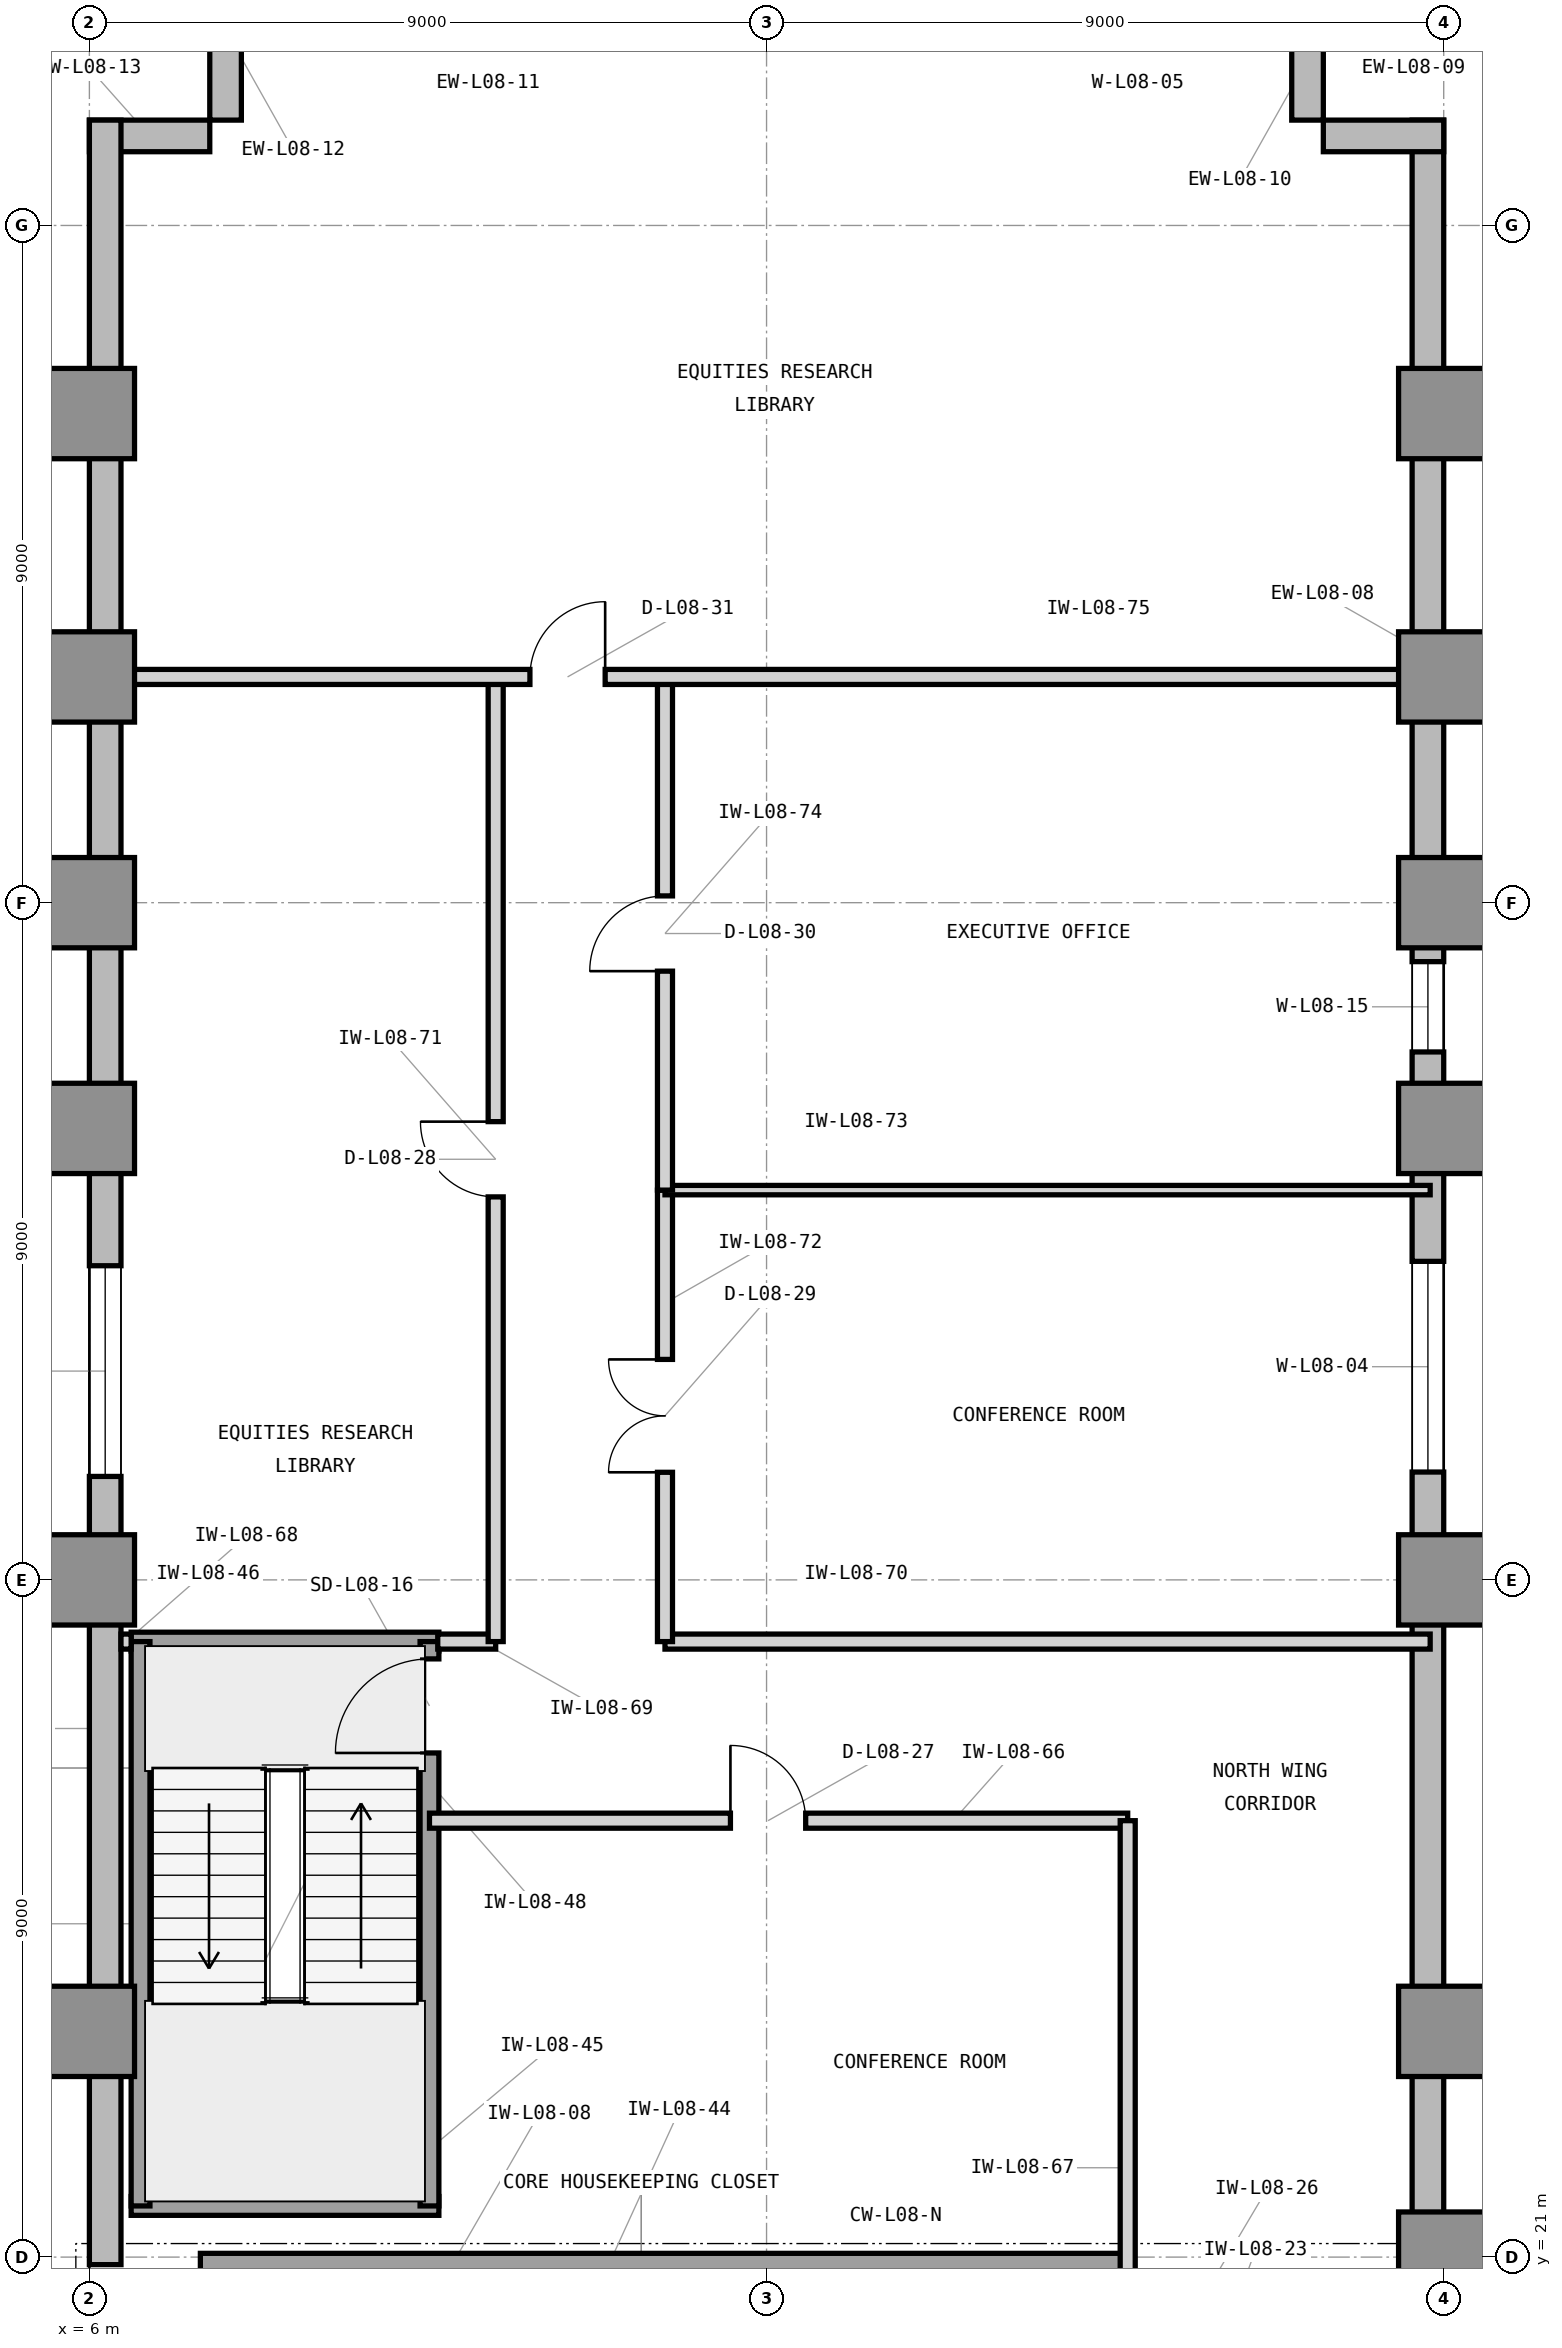
"""IFC4 building model, lengths in metres.
Left out: names, types, materials, properties, quantities, classifications, styles, units other than length and angle.
Written with IfcOpenShell. Run it as: python <this file> out.ifc"""

import sys

from ifc_helpers import new_model, si_unit, direction, frame, frame_2d, origin, origin_2d, place, context, subcontext, project, spatial, rectangle, extrude, element, fill, save


model = new_model("IFC4")
c1 = context("Model", 3, precision=1e-05, world=origin(), true_north=direction((0.0, 1.0)))
c2 = subcontext(c1, "Body", "Model", "MODEL_VIEW")
j1 = project(units=[si_unit("LENGTHUNIT", "METRE"), si_unit("PLANEANGLEUNIT", "RADIAN")], contexts=[c1])
p1 = place(None, origin())
s1 = spatial("IfcSite", under=j1, at=p1, CompositionType="ELEMENT")
p2 = place(p1, origin())
s2 = spatial("IfcBuilding", under=s1, at=p2, CompositionType="ELEMENT")
p3 = place(p2, frame((0.0, 0.0, 38.4)))
s3 = spatial("IfcBuildingStorey", under=s2, at=p3, CompositionType="ELEMENT", Elevation=38.4)
p4 = place(p3, frame((7.475, 20.65, 0.0), z_axis=(0.0, 0.0, 1.0), x_axis=(1.0, 0.0, 0.0)))
e1 = element("IfcWall", 1, at=p4, inside=s3, PredefinedType="SHEAR", context=c2, shape_type="SweptSolid", body=[
    extrude(rectangle(XDim=12.325, YDim=0.8, at=frame_2d((6.163, 0.0))), origin(), (0.0, 0.0, 1.0), 4.2),
])
for number, where, z_axis, x_axis in (
    (2, (24.0, 21.0, 0.0), (0.0, 0.0, 1.0), (1.0, 0.0, 0.0)),
    (3, (6.0, 24.0, 0.0), (0.0, 0.0, 1.0), (1.0, 0.0, 0.0)),
    (4, (24.0, 24.0, 0.0), (0.0, 0.0, 1.0), (1.0, 0.0, 0.0)),
    (5, (6.0, 30.0, 0.0), (0.0, 0.0, 1.0), (1.0, 0.0, 0.0)),
    (6, (24.0, 30.0, 0.0), (0.0, 0.0, 1.0), (1.0, 0.0, 0.0)),
    (7, (6.0, 36.0, 0.0), (0.0, 0.0, 1.0), (1.0, 0.0, 0.0)),
    (8, (24.0, 36.0, 0.0), (0.0, 0.0, 1.0), (1.0, 0.0, 0.0)),
    (9, (6.0, 39.0, 0.0), (0.0, 0.0, 1.0), (1.0, 0.0, 0.0)),
    (10, (24.0, 39.0, 0.0), (0.0, 0.0, 1.0), (1.0, 0.0, 0.0)),
    (11, (6.0, 42.0, 0.0), (0.0, 0.0, 1.0), (1.0, 0.0, 0.0)),
    (12, (24.0, 42.0, 0.0), (0.0, 0.0, 1.0), (1.0, 0.0, 0.0)),
    (13, (6.0, 45.5, 0.0), (0.0, 0.0, 1.0), (1.0, 0.0, 0.0)),
    (14, (24.0, 45.5, 0.0), (0.0, 0.0, 1.0), (1.0, 0.0, 0.0)),
):
    element("IfcColumn", number, at=place(p3, frame(where, z_axis=z_axis, x_axis=x_axis)), inside=s3, PredefinedType="COLUMN", context=c2, shape_type="SweptSolid", body=[
        extrude(rectangle(XDim=1.2, YDim=1.2, at=origin_2d()), origin(), (0.0, 0.0, 1.0), 4.2),
    ])
p5 = place(p3, frame((64.4, 20.79, 0.0), z_axis=(0.0, 0.0, 1.0), x_axis=(-1.0, 0.0, 0.0)))
e15 = element("IfcWall", 15, at=p5, inside=s3, PredefinedType="STANDARD", context=c2, shape_type="SweptSolid", body=[
    extrude(rectangle(XDim=40.4, YDim=0.42, at=frame_2d((20.2, 0.0))), origin(), (0.0, 0.0, 1.0), 3.98),
])
p6 = place(p5, frame((26.375, 0.0, 0.85)))
e16 = element("IfcOpeningElement", 16, at=p6, cuts=e15, PredefinedType="OPENING", context=c2, shape_type="SweptSolid", body=[
    extrude(rectangle(XDim=2.8, YDim=2.45, at=frame_2d((1.4, 1.225))), frame((0.0, 0.22, 0.0), z_axis=(0.0, -1.0, 0.0), x_axis=(1.0, 0.0, 0.0)), (0.0, 0.0, 1.0), 0.44),
])
p7 = place(p5, frame((38.222, 0.0, 0.85)))
e17 = element("IfcOpeningElement", 17, at=p7, cuts=e15, PredefinedType="OPENING", context=c2, shape_type="SweptSolid", body=[
    extrude(rectangle(XDim=1.2, YDim=2.45, at=frame_2d((0.6, 1.225))), frame((0.0, 0.22, 0.0), z_axis=(0.0, -1.0, 0.0), x_axis=(1.0, 0.0, 0.0)), (0.0, 0.0, 1.0), 0.44),
])
p8 = place(p5, frame((32.536, 0.0, 0.85)))
e18 = element("IfcOpeningElement", 18, at=p8, cuts=e15, PredefinedType="OPENING", context=c2, shape_type="SweptSolid", body=[
    extrude(rectangle(XDim=2.8, YDim=2.45, at=frame_2d((1.4, 1.225))), frame((0.0, 0.22, 0.0), z_axis=(0.0, -1.0, 0.0), x_axis=(1.0, 0.0, 0.0)), (0.0, 0.0, 1.0), 0.44),
])
p9 = place(p5, frame((17.386, 0.0, 0.85)))
e19 = element("IfcOpeningElement", 19, at=p9, cuts=e15, PredefinedType="OPENING", context=c2, shape_type="SweptSolid", body=[
    extrude(rectangle(XDim=2.8, YDim=2.45, at=frame_2d((1.4, 1.225))), frame((0.0, 0.22, 0.0), z_axis=(0.0, -1.0, 0.0), x_axis=(1.0, 0.0, 0.0)), (0.0, 0.0, 1.0), 0.44),
])
p10 = place(p3, frame((23.79, 21.0, 0.0), z_axis=(0.0, 0.0, 1.0), x_axis=(0.0, 1.0, 0.0)))
e20 = element("IfcWall", 20, at=p10, inside=s3, PredefinedType="STANDARD", context=c2, shape_type="SweptSolid", body=[
    extrude(rectangle(XDim=28.4, YDim=0.42, at=frame_2d((14.2, 0.0))), origin(), (0.0, 0.0, 1.0), 3.98),
])
p11 = place(p10, frame((10.433, 0.0, 0.85)))
e21 = element("IfcOpeningElement", 21, at=p11, cuts=e20, PredefinedType="OPENING", context=c2, shape_type="SweptSolid", body=[
    extrude(rectangle(XDim=2.8, YDim=2.45, at=frame_2d((1.4, 1.225))), frame((0.0, 0.22, 0.0), z_axis=(0.0, -1.0, 0.0), x_axis=(1.0, 0.0, 0.0)), (0.0, 0.0, 1.0), 0.44),
])
p12 = place(p10, frame((16.016, 0.0, 0.85)))
e22 = element("IfcOpeningElement", 22, at=p12, cuts=e20, PredefinedType="OPENING", context=c2, shape_type="SweptSolid", body=[
    extrude(rectangle(XDim=1.2, YDim=2.45, at=frame_2d((0.6, 1.225))), frame((0.0, 0.22, 0.0), z_axis=(0.0, -1.0, 0.0), x_axis=(1.0, 0.0, 0.0)), (0.0, 0.0, 1.0), 0.44),
])
for number, where, z_axis, x_axis in (
    (23, (24.0, 49.19, 0.0), (0.0, 0.0, 1.0), (-1.0, 0.0, 0.0)),
    (24, (22.19, 49.4, 0.0), (0.0, 0.0, 1.0), (0.0, 1.0, 0.0)),
    (25, (7.81, 51.0, 0.0), (0.0, 0.0, 1.0), (0.0, -1.0, 0.0)),
    (26, (7.6, 49.19, 0.0), (0.0, 0.0, 1.0), (-1.0, 0.0, 0.0)),
):
    element("IfcWall", number, at=place(p3, frame(where, z_axis=z_axis, x_axis=x_axis)), inside=s3, PredefinedType="STANDARD", context=c2, shape_type="SweptSolid", body=[
        extrude(rectangle(XDim=1.6, YDim=0.42, at=frame_2d((0.8, 0.0))), origin(), (0.0, 0.0, 1.0), 3.98),
    ])
p13 = place(p3, frame((6.21, 49.4, 0.0), z_axis=(0.0, 0.0, 1.0), x_axis=(0.0, -1.0, 0.0)))
e27 = element("IfcWall", 27, at=p13, inside=s3, PredefinedType="STANDARD", context=c2, shape_type="SweptSolid", body=[
    extrude(rectangle(XDim=28.5, YDim=0.42, at=frame_2d((14.25, 0.0))), origin(), (0.0, 0.0, 1.0), 3.98),
])
p14 = place(p13, frame((15.225, 0.0, 0.85)))
e28 = element("IfcOpeningElement", 28, at=p14, cuts=e27, PredefinedType="OPENING", context=c2, shape_type="SweptSolid", body=[
    extrude(rectangle(XDim=2.8, YDim=2.45, at=frame_2d((1.4, 1.225))), frame((0.0, 0.22, 0.0), z_axis=(0.0, -1.0, 0.0), x_axis=(1.0, 0.0, 0.0)), (0.0, 0.0, 1.0), 0.44),
])
for number, where, z_axis, x_axis in (
    (29, (6.555, 21.68, 0.0), (0.0, 0.0, 1.0), (1.0, 0.0, 0.0)),
    (30, (6.555, 29.18, 0.0), (0.0, 0.0, 1.0), (1.0, 0.0, 0.0)),
):
    element("IfcWall", number, at=place(p3, frame(where, z_axis=z_axis, x_axis=x_axis)), inside=s3, PredefinedType="SHEAR", context=c2, shape_type="SweptSolid", body=[
        extrude(rectangle(XDim=4.09, YDim=0.25, at=frame_2d((2.045, 0.0))), origin(), (0.0, 0.0, 1.0), 4.2),
    ])
p15 = place(p3, frame((6.68, 21.68, 0.0), z_axis=(0.0, 0.0, 1.0), x_axis=(0.0, 1.0, 0.0)))
e31 = element("IfcWall", 31, at=p15, inside=s3, PredefinedType="SHEAR", context=c2, shape_type="SweptSolid", body=[
    extrude(rectangle(XDim=7.5, YDim=0.25, at=frame_2d((3.75, 0.0))), origin(), (0.0, 0.0, 1.0), 4.2),
])
p16 = place(p3, frame((10.52, 21.68, 0.0), z_axis=(0.0, 0.0, 1.0), x_axis=(0.0, 1.0, 0.0)))
e32 = element("IfcWall", 32, at=p16, inside=s3, PredefinedType="SHEAR", context=c2, shape_type="SweptSolid", body=[
    extrude(rectangle(XDim=7.5, YDim=0.25, at=frame_2d((3.75, 0.0))), origin(), (0.0, 0.0, 1.0), 4.2),
])
p17 = place(p16, frame((6.02, 0.0, 0.0)))
e33 = element("IfcOpeningElement", 33, at=p17, cuts=e32, PredefinedType="OPENING", context=c2, shape_type="SweptSolid", body=[
    extrude(rectangle(XDim=1.25, YDim=2.2, at=frame_2d((0.625, 1.1))), frame((0.0, 0.135, 0.0), z_axis=(0.0, -1.0, 0.0), x_axis=(1.0, 0.0, 0.0)), (0.0, 0.0, 1.0), 0.27),
])
p18 = place(p3, frame((10.52, 26.8, 0.0), z_axis=(0.0, 0.0, 1.0), x_axis=(1.0, 0.0, 0.0)))
e34 = element("IfcWall", 34, at=p18, inside=s3, PredefinedType="PARTITIONING", context=c2, shape_type="SweptSolid", body=[
    extrude(rectangle(XDim=9.28, YDim=0.2, at=frame_2d((4.64, 0.0))), origin(), (0.0, 0.0, 1.0), 3.97),
])
p19 = place(p18, frame((4.0, 0.0, 0.0)))
e35 = element("IfcOpeningElement", 35, at=p19, cuts=e34, PredefinedType="OPENING", context=c2, shape_type="SweptSolid", body=[
    extrude(rectangle(XDim=1.0, YDim=2.15, at=frame_2d((0.5, 1.075))), frame((0.0, 0.11, 0.0), z_axis=(0.0, -1.0, 0.0), x_axis=(1.0, 0.0, 0.0)), (0.0, 0.0, 1.0), 0.22),
])
p20 = place(p3, frame((19.8, 20.65, 0.0), z_axis=(0.0, 0.0, 1.0), x_axis=(0.0, 1.0, 0.0)))
e36 = element("IfcWall", 36, at=p20, inside=s3, PredefinedType="PARTITIONING", context=c2, shape_type="SweptSolid", body=[
    extrude(rectangle(XDim=6.15, YDim=0.2, at=frame_2d((3.075, 0.0))), origin(), (0.0, 0.0, 1.0), 3.97),
])
p21 = place(p3, frame((6.42, 29.18, 0.0), z_axis=(0.0, 0.0, 1.0), x_axis=(1.0, 0.0, 0.0)))
e37 = element("IfcWall", 37, at=p21, inside=s3, PredefinedType="PARTITIONING", context=c2, shape_type="SweptSolid", body=[
    extrude(rectangle(XDim=0.135, YDim=0.2, at=frame_2d((0.067, 0.0))), origin(), (0.0, 0.0, 1.0), 3.97),
])
p22 = place(p3, frame((10.63, 29.18, 0.0), z_axis=(0.0, 0.0, 1.0), x_axis=(1.0, 0.0, 0.0)))
e38 = element("IfcWall", 38, at=p22, inside=s3, PredefinedType="PARTITIONING", context=c2, shape_type="SweptSolid", body=[
    extrude(rectangle(XDim=0.77, YDim=0.2, at=frame_2d((0.385, 0.0))), origin(), (0.0, 0.0, 1.0), 3.97),
])
p23 = place(p3, frame((13.65, 29.18, 0.0), z_axis=(0.0, 0.0, 1.0), x_axis=(1.0, 0.0, 0.0)))
e39 = element("IfcWall", 39, at=p23, inside=s3, PredefinedType="PARTITIONING", context=c2, shape_type="SweptSolid", body=[
    extrude(rectangle(XDim=10.17, YDim=0.2, at=frame_2d((5.085, 0.0))), origin(), (0.0, 0.0, 1.0), 3.97),
])
p24 = place(p3, frame((11.4, 29.18, 0.0), z_axis=(0.0, 0.0, 1.0), x_axis=(0.0, 1.0, 0.0)))
e40 = element("IfcWall", 40, at=p24, inside=s3, PredefinedType="PARTITIONING", context=c2, shape_type="SweptSolid", body=[
    extrude(rectangle(XDim=12.82, YDim=0.2, at=frame_2d((6.41, 0.0))), origin(), (0.0, 0.0, 1.0), 3.97),
])
p25 = place(p24, frame((5.91, 0.0, 0.0)))
e41 = element("IfcOpeningElement", 41, at=p25, cuts=e40, PredefinedType="OPENING", context=c2, shape_type="SweptSolid", body=[
    extrude(rectangle(XDim=1.0, YDim=2.15, at=frame_2d((0.5, 1.075))), frame((0.0, 0.11, 0.0), z_axis=(0.0, -1.0, 0.0), x_axis=(1.0, 0.0, 0.0)), (0.0, 0.0, 1.0), 0.22),
])
p26 = place(p3, frame((13.65, 29.18, 0.0), z_axis=(0.0, 0.0, 1.0), x_axis=(0.0, 1.0, 0.0)))
e42 = element("IfcWall", 42, at=p26, inside=s3, PredefinedType="PARTITIONING", context=c2, shape_type="SweptSolid", body=[
    extrude(rectangle(XDim=6.0, YDim=0.2, at=frame_2d((3.0, 0.0))), origin(), (0.0, 0.0, 1.0), 3.97),
])
p27 = place(p26, frame((2.25, 0.0, 0.0)))
e43 = element("IfcOpeningElement", 43, at=p27, cuts=e42, PredefinedType="OPENING", context=c2, shape_type="SweptSolid", body=[
    extrude(rectangle(XDim=1.5, YDim=2.3, at=frame_2d((0.75, 1.15))), frame((0.0, 0.11, 0.0), z_axis=(0.0, -1.0, 0.0), x_axis=(1.0, 0.0, 0.0)), (0.0, 0.0, 1.0), 0.22),
])
p28 = place(p3, frame((13.65, 35.18, 0.0), z_axis=(0.0, 0.0, 1.0), x_axis=(1.0, 0.0, 0.0)))
e44 = element("IfcWall", 44, at=p28, inside=s3, PredefinedType="PARTITIONING", context=c2, shape_type="SweptSolid", body=[
    extrude(rectangle(XDim=10.17, YDim=0.125, at=frame_2d((5.085, 0.0))), origin(), (0.0, 0.0, 1.0), 3.97),
])
p29 = place(p3, frame((13.65, 35.18, 0.0), z_axis=(0.0, 0.0, 1.0), x_axis=(0.0, 1.0, 0.0)))
e45 = element("IfcWall", 45, at=p29, inside=s3, PredefinedType="PARTITIONING", context=c2, shape_type="SweptSolid", body=[
    extrude(rectangle(XDim=6.82, YDim=0.2, at=frame_2d((3.41, 0.0))), origin(), (0.0, 0.0, 1.0), 3.97),
])
p30 = place(p29, frame((2.91, 0.0, 0.0)))
e46 = element("IfcOpeningElement", 46, at=p30, cuts=e45, PredefinedType="OPENING", context=c2, shape_type="SweptSolid", body=[
    extrude(rectangle(XDim=1.0, YDim=2.15, at=frame_2d((0.5, 1.075))), frame((0.0, 0.11, 0.0), z_axis=(0.0, -1.0, 0.0), x_axis=(1.0, 0.0, 0.0)), (0.0, 0.0, 1.0), 0.22),
])
p31 = place(p3, frame((6.18, 42.0, 0.0), z_axis=(0.0, 0.0, 1.0), x_axis=(1.0, 0.0, 0.0)))
e47 = element("IfcWall", 47, at=p31, inside=s3, PredefinedType="PARTITIONING", context=c2, shape_type="SweptSolid", body=[
    extrude(rectangle(XDim=17.64, YDim=0.2, at=frame_2d((8.82, 0.0))), origin(), (0.0, 0.0, 1.0), 3.114),
])
p32 = place(p31, frame((5.675, 0.0, 0.0)))
e48 = element("IfcOpeningElement", 48, at=p32, cuts=e47, PredefinedType="OPENING", context=c2, shape_type="SweptSolid", body=[
    extrude(rectangle(XDim=1.0, YDim=2.15, at=frame_2d((0.5, 1.075))), frame((0.0, 0.11, 0.0), z_axis=(0.0, -1.0, 0.0), x_axis=(1.0, 0.0, 0.0)), (0.0, 0.0, 1.0), 0.22),
])
p33 = place(p11, origin())
e49 = element("IfcWindow", 49, at=p33, inside=s3, PartitioningType="SINGLE_PANEL", PredefinedType="WINDOW", context=c2, shape_type="SweptSolid", body=[
    extrude(rectangle(XDim=2.8, YDim=2.45, at=frame_2d((1.4, 1.225))), frame((0.0, 0.11, 0.0), z_axis=(0.0, -1.0, 0.0), x_axis=(1.0, 0.0, 0.0)), (0.0, 0.0, 1.0), 0.06),
])
fill(e21, e49)
p34 = place(p14, origin())
e50 = element("IfcWindow", 50, at=p34, inside=s3, PartitioningType="SINGLE_PANEL", PredefinedType="WINDOW", context=c2, shape_type="SweptSolid", body=[
    extrude(rectangle(XDim=2.8, YDim=2.45, at=frame_2d((1.4, 1.225))), frame((0.0, 0.11, 0.0), z_axis=(0.0, -1.0, 0.0), x_axis=(1.0, 0.0, 0.0)), (0.0, 0.0, 1.0), 0.06),
])
fill(e28, e50)
p35 = place(p17, origin())
e51 = element("IfcDoor", 51, at=p35, inside=s3, OperationType="SINGLE_SWING_LEFT", PredefinedType="DOOR", context=c2, shape_type="SweptSolid", body=[
    extrude(rectangle(XDim=1.25, YDim=2.2, at=frame_2d((0.625, 1.1))), frame((0.0, 0.025, 0.0), z_axis=(0.0, -1.0, 0.0), x_axis=(1.0, 0.0, 0.0)), (0.0, 0.0, 1.0), 0.05),
])
fill(e33, e51)
p36 = place(p19, origin())
e52 = element("IfcDoor", 52, at=p36, inside=s3, OperationType="SINGLE_SWING_LEFT", PredefinedType="DOOR", context=c2, shape_type="SweptSolid", body=[
    extrude(rectangle(XDim=1.0, YDim=2.15, at=frame_2d((0.5, 1.075))), frame((0.0, 0.025, 0.0), z_axis=(0.0, -1.0, 0.0), x_axis=(1.0, 0.0, 0.0)), (0.0, 0.0, 1.0), 0.05),
])
fill(e35, e52)
p37 = place(p25, origin())
e53 = element("IfcDoor", 53, at=p37, inside=s3, OperationType="SINGLE_SWING_RIGHT", PredefinedType="DOOR", context=c2, shape_type="SweptSolid", body=[
    extrude(rectangle(XDim=1.0, YDim=2.15, at=frame_2d((0.5, 1.075))), frame((0.0, 0.025, 0.0), z_axis=(0.0, -1.0, 0.0), x_axis=(1.0, 0.0, 0.0)), (0.0, 0.0, 1.0), 0.05),
])
fill(e41, e53)
p38 = place(p27, origin())
e54 = element("IfcDoor", 54, at=p38, inside=s3, OperationType="DOUBLE_DOOR_SINGLE_SWING", PredefinedType="DOOR", context=c2, shape_type="SweptSolid", body=[
    extrude(rectangle(XDim=1.5, YDim=2.3, at=frame_2d((0.75, 1.15))), frame((0.0, 0.025, 0.0), z_axis=(0.0, -1.0, 0.0), x_axis=(1.0, 0.0, 0.0)), (0.0, 0.0, 1.0), 0.05),
])
fill(e43, e54)
p39 = place(p30, origin())
e55 = element("IfcDoor", 55, at=p39, inside=s3, OperationType="SINGLE_SWING_LEFT", PredefinedType="DOOR", context=c2, shape_type="SweptSolid", body=[
    extrude(rectangle(XDim=1.0, YDim=2.15, at=frame_2d((0.5, 1.075))), frame((0.0, 0.025, 0.0), z_axis=(0.0, -1.0, 0.0), x_axis=(1.0, 0.0, 0.0)), (0.0, 0.0, 1.0), 0.05),
])
fill(e46, e55)
p40 = place(p32, origin())
e56 = element("IfcDoor", 56, at=p40, inside=s3, OperationType="SINGLE_SWING_RIGHT", PredefinedType="DOOR", context=c2, shape_type="SweptSolid", body=[
    extrude(rectangle(XDim=1.0, YDim=2.15, at=frame_2d((0.5, 1.075))), frame((0.0, 0.025, 0.0), z_axis=(0.0, -1.0, 0.0), x_axis=(1.0, 0.0, 0.0)), (0.0, 0.0, 1.0), 0.05),
])
fill(e48, e56)
p41 = place(p12, origin())
e57 = element("IfcWindow", 57, at=p41, inside=s3, PartitioningType="SINGLE_PANEL", PredefinedType="WINDOW", context=c2, shape_type="SweptSolid", body=[
    extrude(rectangle(XDim=1.2, YDim=2.45, at=frame_2d((0.6, 1.225))), frame((0.0, 0.11, 0.0), z_axis=(0.0, -1.0, 0.0), x_axis=(1.0, 0.0, 0.0)), (0.0, 0.0, 1.0), 0.06),
])
fill(e22, e57)
save(model, sys.argv[1])
